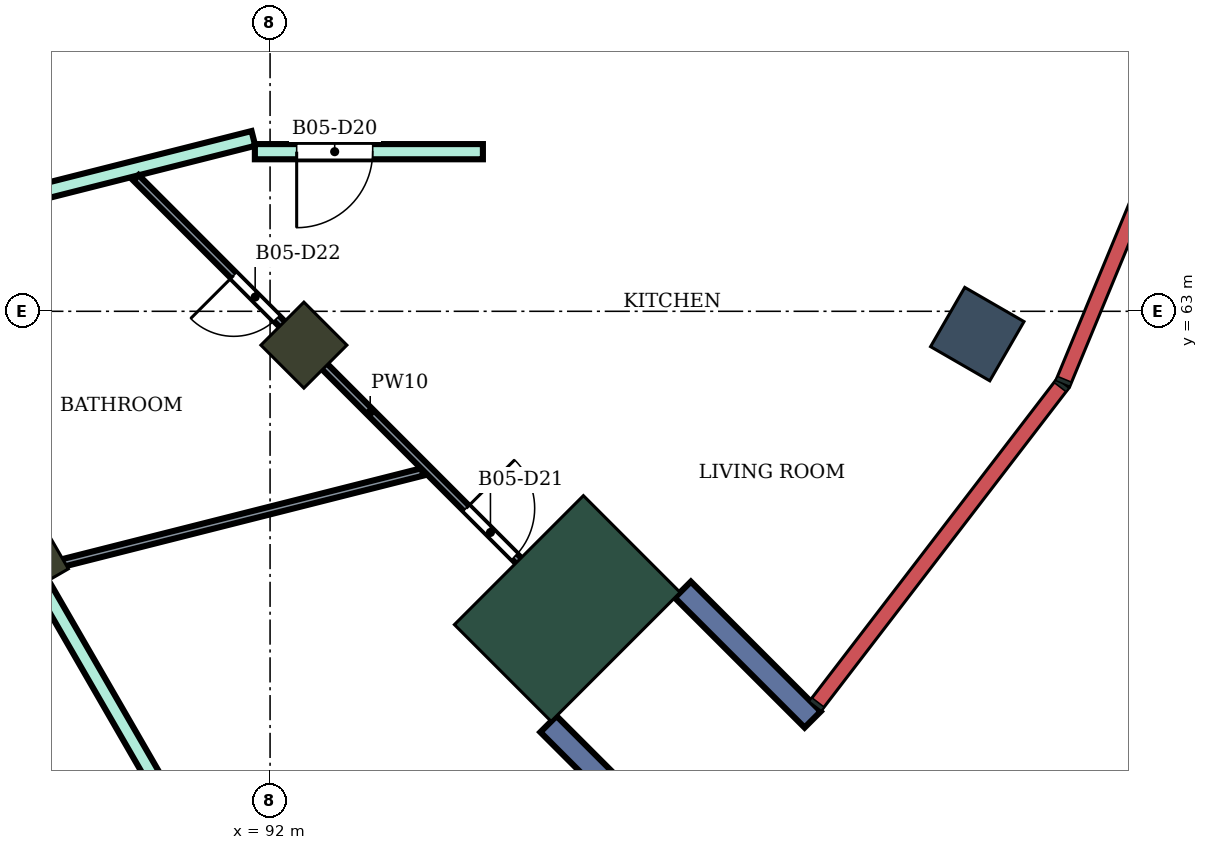
"""IFC4 building model, lengths in metres.
Left out: names, types, materials, properties, quantities, classifications, styles, units other than length and angle.
Written with IfcOpenShell. Run it as: python <this file> out.ifc"""

import sys

from ifc_helpers import new_model, si_unit, direction, frame, frame_2d, origin, origin_2d, place, context, subcontext, project, spatial, rectangle, extrude, element, fill, save


model = new_model("IFC4")
c1 = context("Model", 3, precision=1e-05, world=origin(), true_north=direction((0.0, 1.0)))
c2 = subcontext(c1, "Body", "Model", "MODEL_VIEW")
j1 = project(units=[si_unit("LENGTHUNIT", "METRE"), si_unit("PLANEANGLEUNIT", "RADIAN")], contexts=[c1])
p1 = place(None, origin())
s1 = spatial("IfcSite", under=j1, at=p1, CompositionType="ELEMENT")
p2 = place(p1, origin())
s2 = spatial("IfcBuilding", under=s1, at=p2, CompositionType="ELEMENT")
p3 = place(p2, frame((0.0, 0.0, 266.7)))
s3 = spatial("IfcBuildingStorey", under=s2, at=p3, CompositionType="ELEMENT", Elevation=266.7)
p4 = place(p3, frame((101.304, 62.7, 0.0), z_axis=(0.0, 0.0, 1.0), x_axis=(0.866025403784, -0.5, 0.0)))
e1 = element("IfcColumn", 1, at=p4, inside=s3, PredefinedType="COLUMN", context=c2, shape_type="SweptSolid", body=[
    extrude(rectangle(XDim=0.9, YDim=0.9, at=origin_2d()), origin(), (0.0, 0.0, 1.0), 4.2),
])
for number, where, z_axis, x_axis in (
    (2, (88.8, 59.758, 0.0), (0.0, 0.0, 1.0), (0.5, -0.866, 0.0)),
    (3, (92.445, 62.555, 0.0), (0.0, 0.0, 1.0), (0.707, -0.707, 0.0)),
):
    element("IfcColumn", number, at=place(p3, frame(where, z_axis=z_axis, x_axis=x_axis)), inside=s3, PredefinedType="COLUMN", context=c2, shape_type="SweptSolid", body=[
        extrude(rectangle(XDim=0.8, YDim=0.8, at=origin_2d()), origin(), (0.0, 0.0, 1.0), 4.2),
    ])
p5 = place(p3, frame((95.91, 59.09, 0.0), z_axis=(0.0, 0.0, 1.0), x_axis=(0.707106781187, -0.707106781187, 0.0)))
e4 = element("IfcColumn", 4, at=p5, inside=s3, PredefinedType="COLUMN", context=c2, shape_type="SweptSolid", body=[
    extrude(rectangle(XDim=1.8, YDim=2.4, at=origin_2d()), origin(), (0.0, 0.0, 1.0), 4.2),
])
for number, where, z_axis, x_axis in (
    (5, (95.662, 57.57, 0.0), (0.0, 0.0, 1.0), (0.707, -0.707, 0.0)),
    (6, (97.43, 59.338, 0.0), (0.0, 0.0, 1.0), (0.707, -0.707, 0.0)),
):
    element("IfcWall", number, at=place(p3, frame(where, z_axis=z_axis, x_axis=x_axis)), inside=s3, PredefinedType="NOTDEFINED", context=c2, shape_type="SweptSolid", body=[
        extrude(rectangle(XDim=2.416, YDim=0.3, at=frame_2d((1.208, 0.0))), origin(), (0.0, 0.0, 1.0), 4.2),
    ])
p6 = place(p3, frame((86.053, 63.826, 0.0), z_axis=(0.0, 0.0, 1.0), x_axis=(0.969490004987, 0.245130843083, 0.0)))
e7 = element("IfcWall", 7, at=p6, inside=s3, PredefinedType="PARTITIONING", context=c2, shape_type="SweptSolid", body=[
    extrude(rectangle(XDim=5.908, YDim=0.2, at=frame_2d((2.954, 0.0))), origin(), (0.0, 0.0, 1.0), 3.75),
])
p7 = place(p3, frame((86.465, 63.801, 0.0), z_axis=(0.0, 0.0, 1.0), x_axis=(0.499914633865, -0.866074684336, 0.0)))
e8 = element("IfcWall", 8, at=p7, inside=s3, PredefinedType="PARTITIONING", context=c2, shape_type="SweptSolid", body=[
    extrude(rectangle(XDim=12.866, YDim=0.2, at=frame_2d((6.433, 0.0))), origin(), (0.0, 0.0, 1.0), 3.75),
])
p8 = place(p3, frame((91.8, 65.1, 0.0), z_axis=(0.0, 0.0, 1.0), x_axis=(1.0, 0.0, 0.0)))
e9 = element("IfcWall", 9, at=p8, inside=s3, PredefinedType="PARTITIONING", context=c2, shape_type="SweptSolid", body=[
    extrude(rectangle(XDim=3.0, YDim=0.2, at=frame_2d((1.5, 0.0))), origin(), (0.0, 0.0, 1.0), 3.75),
])
p9 = place(p8, frame((0.55, 0.0, 0.0)))
e10 = element("IfcOpeningElement", 10, at=p9, cuts=e9, PredefinedType="OPENING", context=c2, shape_type="SweptSolid", body=[
    extrude(rectangle(XDim=1.0, YDim=2.1, at=frame_2d((0.5, 1.05))), frame((0.0, 0.11, 0.0), z_axis=(0.0, -1.0, 0.0), x_axis=(1.0, 0.0, 0.0)), (0.0, 0.0, 1.0), 0.22),
])
p10 = place(p3, frame((89.002, 59.621, 0.0), z_axis=(0.0, 0.0, 1.0), x_axis=(0.969445576262, 0.245306491285, 0.0)))
e11 = element("IfcWall", 11, at=p10, inside=s3, PredefinedType="PARTITIONING", context=c2, shape_type="SweptSolid", body=[
    extrude(rectangle(XDim=5.16, YDim=0.1, at=frame_2d((2.58, 0.0))), origin(), (0.0, 0.0, 1.0), 3.75),
])
p11 = place(p3, frame((90.235, 64.757, 0.0), z_axis=(0.0, 0.0, 1.0), x_axis=(0.706924769926, -0.707288745609, 0.0)))
e12 = element("IfcWall", 12, at=p11, inside=s3, PredefinedType="PARTITIONING", context=c2, shape_type="SweptSolid", body=[
    extrude(rectangle(XDim=8.72, YDim=0.1, at=frame_2d((4.36, 0.0))), origin(), (0.0, 0.0, 1.0), 3.75),
])
p12 = place(p11, frame((6.148, 0.0, 0.0)))
e13 = element("IfcOpeningElement", 13, at=p12, cuts=e12, PredefinedType="OPENING", context=c2, shape_type="SweptSolid", body=[
    extrude(rectangle(XDim=0.9, YDim=2.1, at=frame_2d((0.45, 1.05))), frame((0.0, 0.06, 0.0), z_axis=(0.0, -1.0, 0.0), x_axis=(1.0, 0.0, 0.0)), (0.0, 0.0, 1.0), 0.12),
])
p13 = place(p11, frame((1.819, 0.0, 0.0)))
e14 = element("IfcOpeningElement", 14, at=p13, cuts=e12, PredefinedType="OPENING", context=c2, shape_type="SweptSolid", body=[
    extrude(rectangle(XDim=0.8, YDim=2.1, at=frame_2d((0.4, 1.05))), frame((0.0, 0.06, 0.0), z_axis=(0.0, -1.0, 0.0), x_axis=(1.0, 0.0, 0.0)), (0.0, 0.0, 1.0), 0.12),
])
p14 = place(p9, frame((1.0, 0.0, 0.0), z_axis=(0.0, 0.0, 1.0), x_axis=(-1.0, 0.0, 0.0)))
e15 = element("IfcDoor", 15, at=p14, inside=s3, OperationType="SINGLE_SWING_RIGHT", PredefinedType="DOOR", context=c2, shape_type="SweptSolid", body=[
    extrude(rectangle(XDim=1.0, YDim=2.1, at=frame_2d((0.5, 1.05))), frame((0.0, 0.025, 0.0), z_axis=(0.0, -1.0, 0.0), x_axis=(1.0, 0.0, 0.0)), (0.0, 0.0, 1.0), 0.05),
])
fill(e10, e15)
p15 = place(p12, origin())
e16 = element("IfcDoor", 16, at=p15, inside=s3, OperationType="SINGLE_SWING_LEFT", PredefinedType="DOOR", context=c2, shape_type="SweptSolid", body=[
    extrude(rectangle(XDim=0.9, YDim=2.1, at=frame_2d((0.45, 1.05))), frame((0.0, 0.025, 0.0), z_axis=(0.0, -1.0, 0.0), x_axis=(1.0, 0.0, 0.0)), (0.0, 0.0, 1.0), 0.05),
])
fill(e13, e16)
p16 = place(p13, frame((0.8, 0.0, 0.0), z_axis=(0.0, 0.0, 1.0), x_axis=(-1.0, 0.0, 0.0)))
e17 = element("IfcDoor", 17, at=p16, inside=s3, OperationType="SINGLE_SWING_RIGHT", PredefinedType="DOOR", context=c2, shape_type="SweptSolid", body=[
    extrude(rectangle(XDim=0.8, YDim=2.1, at=frame_2d((0.4, 1.05))), frame((0.0, 0.025, 0.0), z_axis=(0.0, -1.0, 0.0), x_axis=(1.0, 0.0, 0.0)), (0.0, 0.0, 1.0), 0.05),
])
fill(e14, e17)
save(model, sys.argv[1])
